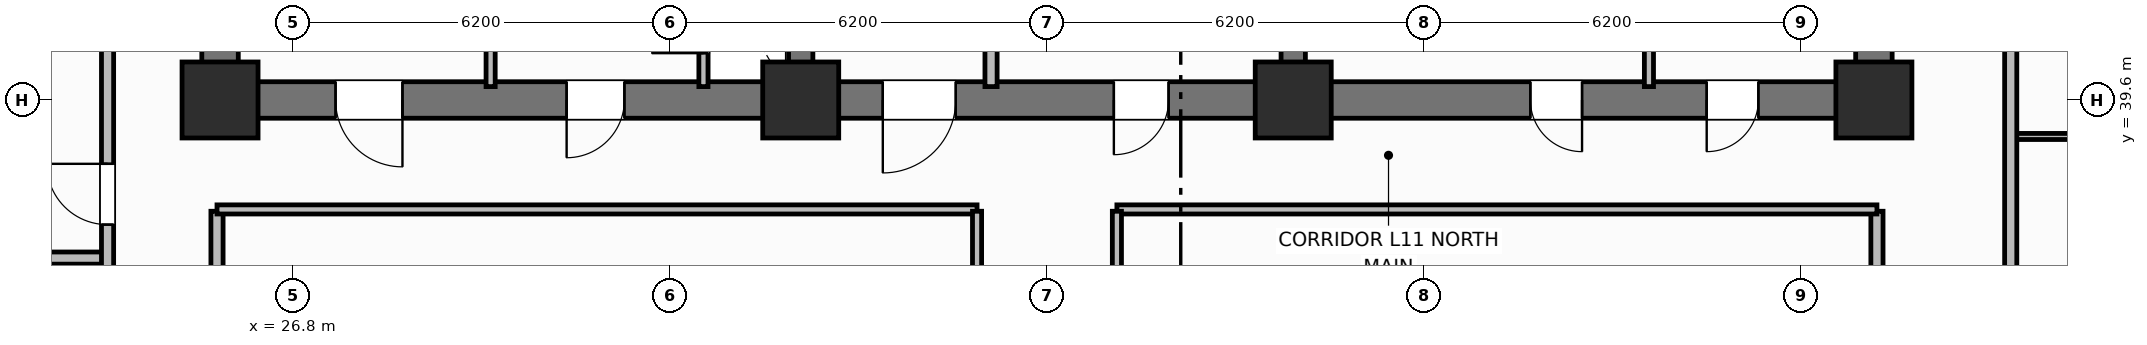
"""IFC4 building model, lengths in metres.
Left out: names, types, materials, properties, quantities, classifications, styles, units other than length and angle.
Written with IfcOpenShell. Run it as: python <this file> out.ifc"""

import sys

from ifc_helpers import new_model, si_unit, direction, frame, frame_2d, origin, origin_2d, place, context, subcontext, project, spatial, rectangle, extrude, element, fill, save


model = new_model("IFC4")
c1 = context("Model", 3, precision=1e-05, world=origin(), true_north=direction((0.0, 1.0)))
c2 = subcontext(c1, "Body", "Model", "MODEL_VIEW")
j1 = project(units=[si_unit("LENGTHUNIT", "METRE"), si_unit("PLANEANGLEUNIT", "RADIAN")], contexts=[c1])
p1 = place(None, origin())
s1 = spatial("IfcSite", under=j1, at=p1, CompositionType="ELEMENT")
p2 = place(p1, origin())
s2 = spatial("IfcBuilding", under=s1, at=p2, CompositionType="ELEMENT")
p3 = place(p2, frame((0.0, 0.0, 47.3)))
s3 = spatial("IfcBuildingStorey", under=s2, at=p3, CompositionType="ELEMENT", Elevation=47.3)
for number, where, z_axis, x_axis in (
    (1, (25.6, 39.9, 0.0), (0.0, 0.0, 1.0), (0.0, 1.0, 0.0)),
    (2, (52.8, 39.9, 0.0), (0.0, 0.0, 1.0), (0.0, 1.0, 0.0)),
):
    element("IfcWall", number, at=place(p3, frame(where, z_axis=z_axis, x_axis=x_axis)), inside=s3, PredefinedType="SHEAR", context=c2, shape_type="SweptSolid", body=[
        extrude(rectangle(XDim=5.6, YDim=0.6, at=frame_2d((2.8, 0.0))), origin(), (0.0, 0.0, 1.0), 3.7),
    ])
p4 = place(p3, frame((52.8, 39.6, 0.0), z_axis=(0.0, 0.0, 1.0), x_axis=(-1.0, 0.0, 0.0)))
e3 = element("IfcWall", 3, at=p4, inside=s3, PredefinedType="SHEAR", context=c2, shape_type="SweptSolid", body=[
    extrude(rectangle(XDim=27.2, YDim=0.6, at=frame_2d((13.6, 0.0))), origin(), (0.0, 0.0, 1.0), 3.7),
])
p5 = place(p4, frame((24.2, 0.0, 0.0)))
e4 = element("IfcOpeningElement", 4, at=p5, cuts=e3, PredefinedType="OPENING", context=c2, shape_type="SweptSolid", body=[
    extrude(rectangle(XDim=1.1, YDim=2.15, at=frame_2d((0.55, 1.075))), frame((0.0, 0.31, 0.0), z_axis=(0.0, -1.0, 0.0), x_axis=(1.0, 0.0, 0.0)), (0.0, 0.0, 1.0), 0.62),
])
p6 = place(p4, frame((20.55, 0.0, 0.0)))
e5 = element("IfcOpeningElement", 5, at=p6, cuts=e3, PredefinedType="OPENING", context=c2, shape_type="SweptSolid", body=[
    extrude(rectangle(XDim=0.95, YDim=2.1, at=frame_2d((0.475, 1.05))), frame((0.0, 0.31, 0.0), z_axis=(0.0, -1.0, 0.0), x_axis=(1.0, 0.0, 0.0)), (0.0, 0.0, 1.0), 0.62),
])
p7 = place(p4, frame((15.1, 0.0, 0.0)))
e6 = element("IfcOpeningElement", 6, at=p7, cuts=e3, PredefinedType="OPENING", context=c2, shape_type="SweptSolid", body=[
    extrude(rectangle(XDim=1.2, YDim=2.15, at=frame_2d((0.6, 1.075))), frame((0.0, 0.31, 0.0), z_axis=(0.0, -1.0, 0.0), x_axis=(1.0, 0.0, 0.0)), (0.0, 0.0, 1.0), 0.62),
])
p8 = place(p4, frame((11.6, 0.0, 0.0)))
e7 = element("IfcOpeningElement", 7, at=p8, cuts=e3, PredefinedType="OPENING", context=c2, shape_type="SweptSolid", body=[
    extrude(rectangle(XDim=0.9, YDim=2.1, at=frame_2d((0.45, 1.05))), frame((0.0, 0.31, 0.0), z_axis=(0.0, -1.0, 0.0), x_axis=(1.0, 0.0, 0.0)), (0.0, 0.0, 1.0), 0.62),
])
p9 = place(p4, frame((4.8, 0.0, 0.0)))
e8 = element("IfcOpeningElement", 8, at=p9, cuts=e3, PredefinedType="OPENING", context=c2, shape_type="SweptSolid", body=[
    extrude(rectangle(XDim=0.85, YDim=2.1, at=frame_2d((0.425, 1.05))), frame((0.0, 0.31, 0.0), z_axis=(0.0, -1.0, 0.0), x_axis=(1.0, 0.0, 0.0)), (0.0, 0.0, 1.0), 0.62),
])
p10 = place(p4, frame((1.9, 0.0, 0.0)))
e9 = element("IfcOpeningElement", 9, at=p10, cuts=e3, PredefinedType="OPENING", context=c2, shape_type="SweptSolid", body=[
    extrude(rectangle(XDim=0.85, YDim=2.1, at=frame_2d((0.425, 1.05))), frame((0.0, 0.31, 0.0), z_axis=(0.0, -1.0, 0.0), x_axis=(1.0, 0.0, 0.0)), (0.0, 0.0, 1.0), 0.62),
])
for number, where, z_axis, x_axis in (
    (10, (35.15, 39.9, 0.0), (0.0, 0.0, 1.0), (0.0, 1.0, 0.0)),
    (11, (43.25, 39.9, 0.0), (0.0, 0.0, 1.0), (0.0, 1.0, 0.0)),
):
    element("IfcWall", number, at=place(p3, frame(where, z_axis=z_axis, x_axis=x_axis)), inside=s3, PredefinedType="SHEAR", context=c2, shape_type="SweptSolid", body=[
        extrude(rectangle(XDim=5.6, YDim=0.4, at=frame_2d((2.8, 0.0))), origin(), (0.0, 0.0, 1.0), 3.7),
    ])
for number, where, z_axis, x_axis in (
    (12, (25.6, 39.6, 0.0), (0.0, 0.0, 1.0), (1.0, 0.0, 0.0)),
    (13, (35.15, 39.6, 0.0), (0.0, 0.0, 1.0), (1.0, 0.0, 0.0)),
    (14, (43.25, 39.6, 0.0), (0.0, 0.0, 1.0), (1.0, 0.0, 0.0)),
    (15, (52.8, 39.6, 0.0), (0.0, 0.0, 1.0), (1.0, 0.0, 0.0)),
):
    element("IfcColumn", number, at=place(p3, frame(where, z_axis=z_axis, x_axis=x_axis)), inside=s3, PredefinedType="COLUMN", context=c2, shape_type="SweptSolid", body=[
        extrude(rectangle(XDim=1.25, YDim=1.25, at=origin_2d()), origin(), (0.0, 0.0, 1.0), 3.7),
    ])
p11 = place(p3, frame((33.55, 39.82, 0.0), z_axis=(0.0, 0.0, 1.0), x_axis=(0.0, 1.0, 0.0)))
e16 = element("IfcWall", 16, at=p11, inside=s3, PredefinedType="PARTITIONING", context=c2, shape_type="SweptSolid", body=[
    extrude(rectangle(XDim=2.13, YDim=0.15, at=frame_2d((1.065, 0.0))), origin(), (0.0, 0.0, 1.0), 2.53),
])
p12 = place(p11, frame((0.55, 0.0, 0.0)))
e17 = element("IfcOpeningElement", 17, at=p12, cuts=e16, PredefinedType="OPENING", context=c2, shape_type="SweptSolid", body=[
    extrude(rectangle(XDim=0.85, YDim=2.05, at=frame_2d((0.425, 1.025))), frame((0.0, 0.085, 0.0), z_axis=(0.0, -1.0, 0.0), x_axis=(1.0, 0.0, 0.0)), (0.0, 0.0, 1.0), 0.17),
])
p13 = place(p3, frame((30.05, 39.82, 0.0), z_axis=(0.0, 0.0, 1.0), x_axis=(0.0, 1.0, 0.0)))
e18 = element("IfcWall", 18, at=p13, inside=s3, PredefinedType="PARTITIONING", context=c2, shape_type="SweptSolid", body=[
    extrude(rectangle(XDim=2.13, YDim=0.15, at=frame_2d((1.065, 0.0))), origin(), (0.0, 0.0, 1.0), 2.53),
])
p14 = place(p3, frame((38.28, 39.82, 0.0), z_axis=(0.0, 0.0, 1.0), x_axis=(0.0, 1.0, 0.0)))
e19 = element("IfcWall", 19, at=p14, inside=s3, PredefinedType="PARTITIONING", context=c2, shape_type="SweptSolid", body=[
    extrude(rectangle(XDim=2.73, YDim=0.2, at=frame_2d((1.365, 0.0))), origin(), (0.0, 0.0, 1.0), 2.53),
])
p15 = place(p3, frame((49.1, 39.82, 0.0), z_axis=(0.0, 0.0, 1.0), x_axis=(0.0, 1.0, 0.0)))
e20 = element("IfcWall", 20, at=p15, inside=s3, PredefinedType="PARTITIONING", context=c2, shape_type="SweptSolid", body=[
    extrude(rectangle(XDim=2.73, YDim=0.15, at=frame_2d((1.365, 0.0))), origin(), (0.0, 0.0, 1.0), 2.53),
])
for number, where, z_axis, x_axis in (
    (21, (25.55, 18.63, 0.0), (0.0, 0.0, 1.0), (0.0, 1.0, 0.0)),
    (22, (52.85, 18.63, 0.0), (0.0, 0.0, 1.0), (0.0, 1.0, 0.0)),
):
    element("IfcWall", number, at=place(p3, frame(where, z_axis=z_axis, x_axis=x_axis)), inside=s3, PredefinedType="PARTITIONING", context=c2, shape_type="SweptSolid", body=[
        extrude(rectangle(XDim=19.14, YDim=0.2, at=frame_2d((9.57, 0.0))), origin(), (0.0, 0.0, 1.0), 2.53),
    ])
for number, where, z_axis, x_axis in (
    (23, (25.55, 37.8, 0.0), (0.0, 0.0, 1.0), (1.0, 0.0, 0.0)),
    (24, (40.35, 37.8, 0.0), (0.0, 0.0, 1.0), (1.0, 0.0, 0.0)),
):
    element("IfcWall", number, at=place(p3, frame(where, z_axis=z_axis, x_axis=x_axis)), inside=s3, PredefinedType="PARTITIONING", context=c2, shape_type="SweptSolid", body=[
        extrude(rectangle(XDim=12.5, YDim=0.15, at=frame_2d((6.25, 0.0))), origin(), (0.0, 0.0, 1.0), 2.53),
    ])
p16 = place(p3, frame((38.05, 18.63, 0.0), z_axis=(0.0, 0.0, 1.0), x_axis=(0.0, 1.0, 0.0)))
e25 = element("IfcWall", 25, at=p16, inside=s3, PredefinedType="PARTITIONING", context=c2, shape_type="SweptSolid", body=[
    extrude(rectangle(XDim=19.14, YDim=0.15, at=frame_2d((9.57, 0.0))), origin(), (0.0, 0.0, 1.0), 2.53),
])
p17 = place(p16, frame((2.2, 0.0, 0.0)))
e26 = element("IfcOpeningElement", 26, at=p17, cuts=e25, PredefinedType="OPENING", context=c2, shape_type="SweptSolid", body=[
    extrude(rectangle(XDim=1.0, YDim=2.15, at=frame_2d((0.5, 1.075))), frame((0.0, 0.085, 0.0), z_axis=(0.0, -1.0, 0.0), x_axis=(1.0, 0.0, 0.0)), (0.0, 0.0, 1.0), 0.17),
])
p18 = place(p16, frame((10.604, 0.0, 0.0)))
e27 = element("IfcOpeningElement", 27, at=p18, cuts=e25, PredefinedType="OPENING", context=c2, shape_type="SweptSolid", body=[
    extrude(rectangle(XDim=1.0, YDim=2.15, at=frame_2d((0.5, 1.075))), frame((0.0, 0.085, 0.0), z_axis=(0.0, -1.0, 0.0), x_axis=(1.0, 0.0, 0.0)), (0.0, 0.0, 1.0), 0.17),
])
p19 = place(p3, frame((40.35, 18.63, 0.0), z_axis=(0.0, 0.0, 1.0), x_axis=(0.0, 1.0, 0.0)))
e28 = element("IfcWall", 28, at=p19, inside=s3, PredefinedType="PARTITIONING", context=c2, shape_type="SweptSolid", body=[
    extrude(rectangle(XDim=19.14, YDim=0.15, at=frame_2d((9.57, 0.0))), origin(), (0.0, 0.0, 1.0), 2.53),
])
p20 = place(p19, frame((2.2, 0.0, 0.0)))
e29 = element("IfcOpeningElement", 29, at=p20, cuts=e28, PredefinedType="OPENING", context=c2, shape_type="SweptSolid", body=[
    extrude(rectangle(XDim=1.0, YDim=2.15, at=frame_2d((0.5, 1.075))), frame((0.0, 0.085, 0.0), z_axis=(0.0, -1.0, 0.0), x_axis=(1.0, 0.0, 0.0)), (0.0, 0.0, 1.0), 0.17),
])
p21 = place(p19, frame((10.604, 0.0, 0.0)))
e30 = element("IfcOpeningElement", 30, at=p21, cuts=e28, PredefinedType="OPENING", context=c2, shape_type="SweptSolid", body=[
    extrude(rectangle(XDim=0.9, YDim=2.1, at=frame_2d((0.45, 1.05))), frame((0.0, 0.085, 0.0), z_axis=(0.0, -1.0, 0.0), x_axis=(1.0, 0.0, 0.0)), (0.0, 0.0, 1.0), 0.17),
])
p22 = place(p3, frame((14.57, 37.0, 0.0), z_axis=(0.0, 0.0, 1.0), x_axis=(1.0, 0.0, 0.0)))
e31 = element("IfcWall", 31, at=p22, inside=s3, PredefinedType="PARTITIONING", context=c2, shape_type="SweptSolid", body=[
    extrude(rectangle(XDim=9.18, YDim=0.2, at=frame_2d((4.59, 0.0))), origin(), (0.0, 0.0, 1.0), 2.53),
])
p23 = place(p3, frame((23.75, 10.6, 0.0), z_axis=(0.0, 0.0, 1.0), x_axis=(0.0, 1.0, 0.0)))
e32 = element("IfcWall", 32, at=p23, inside=s3, PredefinedType="PARTITIONING", context=c2, shape_type="SweptSolid", body=[
    extrude(rectangle(XDim=35.2, YDim=0.2, at=frame_2d((17.6, 0.0))), origin(), (0.0, 0.0, 1.0), 2.53),
])
p24 = place(p23, frame((2.65, 0.0, 0.0)))
e33 = element("IfcOpeningElement", 33, at=p24, cuts=e32, PredefinedType="OPENING", context=c2, shape_type="SweptSolid", body=[
    extrude(rectangle(XDim=1.0, YDim=2.15, at=frame_2d((0.5, 1.075))), frame((0.0, 0.11, 0.0), z_axis=(0.0, -1.0, 0.0), x_axis=(1.0, 0.0, 0.0)), (0.0, 0.0, 1.0), 0.22),
])
p25 = place(p23, frame((10.81, 0.0, 0.0)))
e34 = element("IfcOpeningElement", 34, at=p25, cuts=e32, PredefinedType="OPENING", context=c2, shape_type="SweptSolid", body=[
    extrude(rectangle(XDim=1.0, YDim=2.15, at=frame_2d((0.5, 1.075))), frame((0.0, 0.11, 0.0), z_axis=(0.0, -1.0, 0.0), x_axis=(1.0, 0.0, 0.0)), (0.0, 0.0, 1.0), 0.22),
])
p26 = place(p23, frame((19.54, 0.0, 0.0)))
e35 = element("IfcOpeningElement", 35, at=p26, cuts=e32, PredefinedType="OPENING", context=c2, shape_type="SweptSolid", body=[
    extrude(rectangle(XDim=1.0, YDim=2.15, at=frame_2d((0.5, 1.075))), frame((0.0, 0.11, 0.0), z_axis=(0.0, -1.0, 0.0), x_axis=(1.0, 0.0, 0.0)), (0.0, 0.0, 1.0), 0.22),
])
p27 = place(p23, frame((26.95, 0.0, 0.0)))
e36 = element("IfcOpeningElement", 36, at=p27, cuts=e32, PredefinedType="OPENING", context=c2, shape_type="SweptSolid", body=[
    extrude(rectangle(XDim=1.0, YDim=2.15, at=frame_2d((0.5, 1.075))), frame((0.0, 0.11, 0.0), z_axis=(0.0, -1.0, 0.0), x_axis=(1.0, 0.0, 0.0)), (0.0, 0.0, 1.0), 0.22),
])
p28 = place(p3, frame((55.05, 39.0, 0.0), z_axis=(0.0, 0.0, 1.0), x_axis=(1.0, 0.0, 0.0)))
e37 = element("IfcWall", 37, at=p28, inside=s3, PredefinedType="PARTITIONING", context=c2, shape_type="SweptSolid", body=[
    extrude(rectangle(XDim=2.25, YDim=0.1, at=frame_2d((1.125, 0.0))), origin(), (0.0, 0.0, 1.0), 2.53),
])
p29 = place(p3, frame((55.05, 10.6, 0.0), z_axis=(0.0, 0.0, 1.0), x_axis=(0.0, 1.0, 0.0)))
e38 = element("IfcWall", 38, at=p29, inside=s3, PredefinedType="PARTITIONING", context=c2, shape_type="SweptSolid", body=[
    extrude(rectangle(XDim=35.2, YDim=0.2, at=frame_2d((17.6, 0.0))), origin(), (0.0, 0.0, 1.0), 2.53),
])
p30 = place(p29, frame((2.65, 0.0, 0.0)))
e39 = element("IfcOpeningElement", 39, at=p30, cuts=e38, PredefinedType="OPENING", context=c2, shape_type="SweptSolid", body=[
    extrude(rectangle(XDim=1.0, YDim=2.15, at=frame_2d((0.5, 1.075))), frame((0.0, 0.11, 0.0), z_axis=(0.0, -1.0, 0.0), x_axis=(1.0, 0.0, 0.0)), (0.0, 0.0, 1.0), 0.22),
])
p31 = place(p29, frame((22.75, 0.0, 0.0)))
e40 = element("IfcOpeningElement", 40, at=p31, cuts=e38, PredefinedType="OPENING", context=c2, shape_type="SweptSolid", body=[
    extrude(rectangle(XDim=1.0, YDim=2.15, at=frame_2d((0.5, 1.075))), frame((0.0, 0.11, 0.0), z_axis=(0.0, -1.0, 0.0), x_axis=(1.0, 0.0, 0.0)), (0.0, 0.0, 1.0), 0.22),
])
p32 = place(p12, origin())
e41 = element("IfcDoor", 41, at=p32, inside=s3, OperationType="SINGLE_SWING_LEFT", PredefinedType="TRAPDOOR", context=c2, shape_type="SweptSolid", body=[
    extrude(rectangle(XDim=0.85, YDim=2.05, at=frame_2d((0.425, 1.025))), frame((0.0, 0.025, 0.0), z_axis=(0.0, -1.0, 0.0), x_axis=(1.0, 0.0, 0.0)), (0.0, 0.0, 1.0), 0.05),
])
fill(e17, e41)
p33 = place(p27, origin())
e42 = element("IfcDoor", 42, at=p33, inside=s3, OperationType="SINGLE_SWING_RIGHT", PredefinedType="DOOR", context=c2, shape_type="SweptSolid", body=[
    extrude(rectangle(XDim=1.0, YDim=2.15, at=frame_2d((0.5, 1.075))), frame((0.0, 0.025, 0.0), z_axis=(0.0, -1.0, 0.0), x_axis=(1.0, 0.0, 0.0)), (0.0, 0.0, 1.0), 0.05),
])
fill(e36, e42)
p34 = place(p5, origin())
e43 = element("IfcDoor", 43, at=p34, inside=s3, OperationType="SINGLE_SWING_LEFT", PredefinedType="DOOR", context=c2, shape_type="SweptSolid", body=[
    extrude(rectangle(XDim=1.1, YDim=2.15, at=frame_2d((0.55, 1.075))), frame((0.0, 0.025, 0.0), z_axis=(0.0, -1.0, 0.0), x_axis=(1.0, 0.0, 0.0)), (0.0, 0.0, 1.0), 0.05),
])
fill(e4, e43)
p35 = place(p6, origin())
e44 = element("IfcDoor", 44, at=p35, inside=s3, OperationType="SINGLE_SWING_RIGHT", PredefinedType="DOOR", context=c2, shape_type="SweptSolid", body=[
    extrude(rectangle(XDim=0.95, YDim=2.1, at=frame_2d((0.475, 1.05))), frame((0.0, 0.025, 0.0), z_axis=(0.0, -1.0, 0.0), x_axis=(1.0, 0.0, 0.0)), (0.0, 0.0, 1.0), 0.05),
])
fill(e5, e44)
p36 = place(p7, origin())
e45 = element("IfcDoor", 45, at=p36, inside=s3, OperationType="SINGLE_SWING_RIGHT", PredefinedType="DOOR", context=c2, shape_type="SweptSolid", body=[
    extrude(rectangle(XDim=1.2, YDim=2.15, at=frame_2d((0.6, 1.075))), frame((0.0, 0.025, 0.0), z_axis=(0.0, -1.0, 0.0), x_axis=(1.0, 0.0, 0.0)), (0.0, 0.0, 1.0), 0.05),
])
fill(e6, e45)
p37 = place(p8, origin())
e46 = element("IfcDoor", 46, at=p37, inside=s3, OperationType="SINGLE_SWING_RIGHT", PredefinedType="DOOR", context=c2, shape_type="SweptSolid", body=[
    extrude(rectangle(XDim=0.9, YDim=2.1, at=frame_2d((0.45, 1.05))), frame((0.0, 0.025, 0.0), z_axis=(0.0, -1.0, 0.0), x_axis=(1.0, 0.0, 0.0)), (0.0, 0.0, 1.0), 0.05),
])
fill(e7, e46)
p38 = place(p9, origin())
e47 = element("IfcDoor", 47, at=p38, inside=s3, OperationType="SINGLE_SWING_LEFT", PredefinedType="DOOR", context=c2, shape_type="SweptSolid", body=[
    extrude(rectangle(XDim=0.85, YDim=2.1, at=frame_2d((0.425, 1.05))), frame((0.0, 0.025, 0.0), z_axis=(0.0, -1.0, 0.0), x_axis=(1.0, 0.0, 0.0)), (0.0, 0.0, 1.0), 0.05),
])
fill(e8, e47)
p39 = place(p10, origin())
e48 = element("IfcDoor", 48, at=p39, inside=s3, OperationType="SINGLE_SWING_RIGHT", PredefinedType="DOOR", context=c2, shape_type="SweptSolid", body=[
    extrude(rectangle(XDim=0.85, YDim=2.1, at=frame_2d((0.425, 1.05))), frame((0.0, 0.025, 0.0), z_axis=(0.0, -1.0, 0.0), x_axis=(1.0, 0.0, 0.0)), (0.0, 0.0, 1.0), 0.05),
])
fill(e9, e48)
save(model, sys.argv[1])
